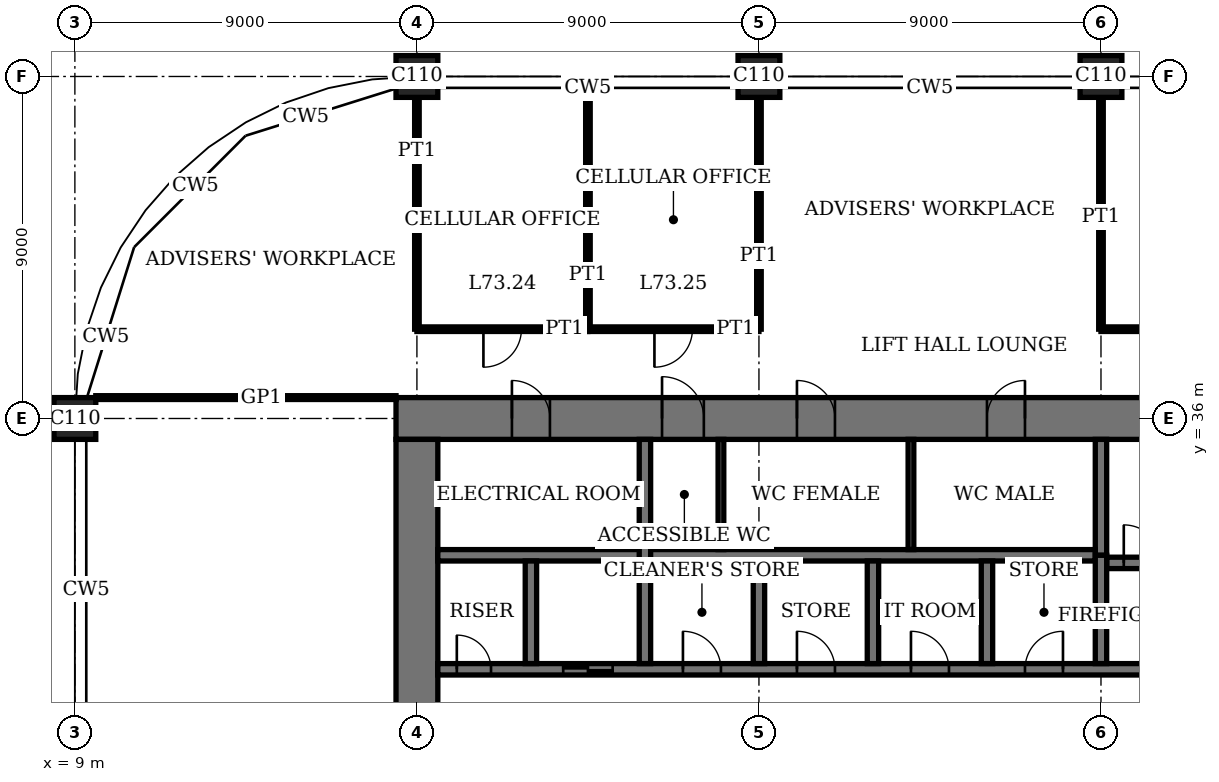
"""IFC4 building model, lengths in metres.
Left out: names, types, materials, properties, quantities, classifications, styles, units other than length and angle.
Written with IfcOpenShell. Run it as: python <this file> out.ifc"""

import sys

from ifc_helpers import new_model, si_unit, direction, frame, frame_2d, origin, origin_2d, place, context, subcontext, project, spatial, rectangle, extrude, element, fill, save


model = new_model("IFC4")
c1 = context("Model", 3, precision=1e-05, world=origin(), true_north=direction((0.0, 1.0)))
c2 = subcontext(c1, "Body", "Model", "MODEL_VIEW")
j1 = project(units=[si_unit("LENGTHUNIT", "METRE"), si_unit("PLANEANGLEUNIT", "RADIAN")], contexts=[c1])
p1 = place(None, origin())
s1 = spatial("IfcSite", under=j1, at=p1, CompositionType="ELEMENT")
p2 = place(p1, origin())
s2 = spatial("IfcBuilding", under=s1, at=p2, CompositionType="ELEMENT")
p3 = place(p2, frame((0.0, 0.0, 299.4)))
s3 = spatial("IfcBuildingStorey", under=s2, at=p3, CompositionType="ELEMENT", Elevation=299.4)
for number, where, z_axis, x_axis in (
    (1, (9.0, 36.0, 0.0), (0.0, 0.0, 1.0), (1.0, 0.0, 0.0)),
    (2, (18.0, 45.0, 0.0), (0.0, 0.0, 1.0), (1.0, 0.0, 0.0)),
    (3, (27.0, 45.0, 0.0), (0.0, 0.0, 1.0), (1.0, 0.0, 0.0)),
    (4, (36.0, 45.0, 0.0), (0.0, 0.0, 1.0), (1.0, 0.0, 0.0)),
):
    element("IfcColumn", number, at=place(p3, frame(where, z_axis=z_axis, x_axis=x_axis)), inside=s3, PredefinedType="COLUMN", context=c2, shape_type="SweptSolid", body=[
        extrude(rectangle(XDim=1.1, YDim=1.1, at=origin_2d()), origin(), (0.0, 0.0, 1.0), 4.0),
    ])
p4 = place(p3, frame((45.55, 36.0, 0.0), z_axis=(0.0, 0.0, 1.0), x_axis=(-1.0, 0.0, 0.0)))
e5 = element("IfcWall", 5, at=p4, inside=s3, PredefinedType="SHEAR", context=c2, shape_type="SweptSolid", body=[
    extrude(rectangle(XDim=28.1, YDim=1.1, at=frame_2d((14.05, 0.0))), origin(), (0.0, 0.0, 1.0), 4.0),
])
p5 = place(p4, frame((11.55, 0.0, 0.0)))
e6 = element("IfcOpeningElement", 6, at=p5, cuts=e5, PredefinedType="OPENING", context=c2, shape_type="SweptSolid", body=[
    extrude(rectangle(XDim=1.0, YDim=2.4, at=frame_2d((0.5, 1.2))), frame((0.0, 0.56, 0.0), z_axis=(0.0, -1.0, 0.0), x_axis=(1.0, 0.0, 0.0)), (0.0, 0.0, 1.0), 1.12),
])
p6 = place(p4, frame((16.55, 0.0, 0.0)))
e7 = element("IfcOpeningElement", 7, at=p6, cuts=e5, PredefinedType="OPENING", context=c2, shape_type="SweptSolid", body=[
    extrude(rectangle(XDim=1.0, YDim=2.4, at=frame_2d((0.5, 1.2))), frame((0.0, 0.56, 0.0), z_axis=(0.0, -1.0, 0.0), x_axis=(1.0, 0.0, 0.0)), (0.0, 0.0, 1.0), 1.12),
])
p7 = place(p4, frame((20.0, 0.0, 0.0)))
e8 = element("IfcOpeningElement", 8, at=p7, cuts=e5, PredefinedType="OPENING", context=c2, shape_type="SweptSolid", body=[
    extrude(rectangle(XDim=1.1, YDim=2.4, at=frame_2d((0.55, 1.2))), frame((0.0, 0.56, 0.0), z_axis=(0.0, -1.0, 0.0), x_axis=(1.0, 0.0, 0.0)), (0.0, 0.0, 1.0), 1.12),
])
p8 = place(p4, frame((24.05, 0.0, 0.0)))
e9 = element("IfcOpeningElement", 9, at=p8, cuts=e5, PredefinedType="OPENING", context=c2, shape_type="SweptSolid", body=[
    extrude(rectangle(XDim=1.0, YDim=2.4, at=frame_2d((0.5, 1.2))), frame((0.0, 0.56, 0.0), z_axis=(0.0, -1.0, 0.0), x_axis=(1.0, 0.0, 0.0)), (0.0, 0.0, 1.0), 1.12),
])
p9 = place(p3, frame((18.0, 35.45, 0.0), z_axis=(0.0, 0.0, 1.0), x_axis=(0.0, -1.0, 0.0)))
e10 = element("IfcWall", 10, at=p9, inside=s3, PredefinedType="SHEAR", context=c2, shape_type="SweptSolid", body=[
    extrude(rectangle(XDim=16.9, YDim=1.1, at=frame_2d((8.45, 0.0))), origin(), (0.0, 0.0, 1.0), 4.0),
])
p10 = place(p9, frame((8.45, 0.0, 0.0)))
e11 = element("IfcOpeningElement", 11, at=p10, cuts=e10, PredefinedType="OPENING", context=c2, shape_type="SweptSolid", body=[
    extrude(rectangle(XDim=1.8, YDim=2.4, at=frame_2d((0.9, 1.2))), frame((0.0, 0.56, 0.0), z_axis=(0.0, -1.0, 0.0), x_axis=(1.0, 0.0, 0.0)), (0.0, 0.0, 1.0), 1.12),
])
p11 = place(p3, frame((36.15, 32.2, 0.0), z_axis=(0.0, 0.0, 1.0), x_axis=(1.0, 0.0, 0.0)))
e12 = element("IfcWall", 12, at=p11, inside=s3, PredefinedType="SHEAR", context=c2, shape_type="SweptSolid", body=[
    extrude(rectangle(XDim=8.3, YDim=0.3, at=frame_2d((4.15, 0.0))), origin(), (0.0, 0.0, 1.0), 4.0),
])
p12 = place(p11, frame((0.45, 0.0, 0.0)))
e13 = element("IfcOpeningElement", 13, at=p12, cuts=e12, PredefinedType="OPENING", context=c2, shape_type="SweptSolid", body=[
    extrude(rectangle(XDim=1.0, YDim=2.4, at=frame_2d((0.5, 1.2))), frame((0.0, 0.16, 0.0), z_axis=(0.0, -1.0, 0.0), x_axis=(1.0, 0.0, 0.0)), (0.0, 0.0, 1.0), 0.32),
])
p13 = place(p3, frame((36.0, 32.4, 0.0), z_axis=(0.0, 0.0, 1.0), x_axis=(0.0, 1.0, 0.0)))
e14 = element("IfcWall", 14, at=p13, inside=s3, PredefinedType="SHEAR", context=c2, shape_type="SweptSolid", body=[
    extrude(rectangle(XDim=3.05, YDim=0.3, at=frame_2d((1.525, 0.0))), origin(), (0.0, 0.0, 1.0), 4.0),
])
p14 = place(p3, frame((18.55, 29.4, 0.0), z_axis=(0.0, 0.0, 1.0), x_axis=(1.0, 0.0, 0.0)))
e15 = element("IfcWall", 15, at=p14, inside=s3, PredefinedType="SHEAR", context=c2, shape_type="SweptSolid", body=[
    extrude(rectangle(XDim=25.9, YDim=0.3, at=frame_2d((12.95, 0.0))), origin(), (0.0, 0.0, 1.0), 4.0),
])
p15 = place(p14, frame((19.95, 0.0, 0.0)))
e16 = element("IfcOpeningElement", 16, at=p15, cuts=e15, PredefinedType="OPENING", context=c2, shape_type="SweptSolid", body=[
    extrude(rectangle(XDim=1.0, YDim=2.4, at=frame_2d((0.5, 1.2))), frame((0.0, 0.16, 0.0), z_axis=(0.0, -1.0, 0.0), x_axis=(1.0, 0.0, 0.0)), (0.0, 0.0, 1.0), 0.32),
])
p16 = place(p14, frame((0.5, 0.0, 0.0)))
e17 = element("IfcOpeningElement", 17, at=p16, cuts=e15, PredefinedType="OPENING", context=c2, shape_type="SweptSolid", body=[
    extrude(rectangle(XDim=0.9, YDim=2.1, at=frame_2d((0.45, 1.05))), frame((0.0, 0.16, 0.0), z_axis=(0.0, -1.0, 0.0), x_axis=(1.0, 0.0, 0.0)), (0.0, 0.0, 1.0), 0.32),
])
p17 = place(p14, frame((15.45, 0.0, 0.0)))
e18 = element("IfcOpeningElement", 18, at=p17, cuts=e15, PredefinedType="OPENING", context=c2, shape_type="SweptSolid", body=[
    extrude(rectangle(XDim=1.0, YDim=2.4, at=frame_2d((0.5, 1.2))), frame((0.0, 0.16, 0.0), z_axis=(0.0, -1.0, 0.0), x_axis=(1.0, 0.0, 0.0)), (0.0, 0.0, 1.0), 0.32),
])
p18 = place(p14, frame((12.45, 0.0, 0.0)))
e19 = element("IfcOpeningElement", 19, at=p18, cuts=e15, PredefinedType="OPENING", context=c2, shape_type="SweptSolid", body=[
    extrude(rectangle(XDim=1.0, YDim=2.4, at=frame_2d((0.5, 1.2))), frame((0.0, 0.16, 0.0), z_axis=(0.0, -1.0, 0.0), x_axis=(1.0, 0.0, 0.0)), (0.0, 0.0, 1.0), 0.32),
])
p19 = place(p14, frame((9.45, 0.0, 0.0)))
e20 = element("IfcOpeningElement", 20, at=p19, cuts=e15, PredefinedType="OPENING", context=c2, shape_type="SweptSolid", body=[
    extrude(rectangle(XDim=1.0, YDim=2.4, at=frame_2d((0.5, 1.2))), frame((0.0, 0.16, 0.0), z_axis=(0.0, -1.0, 0.0), x_axis=(1.0, 0.0, 0.0)), (0.0, 0.0, 1.0), 0.32),
])
p20 = place(p14, frame((6.45, 0.0, 0.0)))
e21 = element("IfcOpeningElement", 21, at=p20, cuts=e15, PredefinedType="OPENING", context=c2, shape_type="SweptSolid", body=[
    extrude(rectangle(XDim=1.0, YDim=2.4, at=frame_2d((0.5, 1.2))), frame((0.0, 0.16, 0.0), z_axis=(0.0, -1.0, 0.0), x_axis=(1.0, 0.0, 0.0)), (0.0, 0.0, 1.0), 0.32),
])
p21 = place(p14, frame((3.3, 0.0, 0.0)))
e22 = element("IfcOpeningElement", 22, at=p21, cuts=e15, PredefinedType="OPENING", context=c2, shape_type="SweptSolid", body=[
    extrude(rectangle(XDim=1.3, YDim=2.4, at=frame_2d((0.65, 1.2))), frame((0.0, 0.16, 0.0), z_axis=(0.0, -1.0, 0.0), x_axis=(1.0, 0.0, 0.0)), (0.0, 0.0, 1.0), 0.32),
])
p22 = place(p3, frame((18.55, 32.4, 0.0), z_axis=(0.0, 0.0, 1.0), x_axis=(1.0, 0.0, 0.0)))
e23 = element("IfcWall", 23, at=p22, inside=s3, PredefinedType="SHEAR", context=c2, shape_type="SweptSolid", body=[
    extrude(rectangle(XDim=17.3, YDim=0.3, at=frame_2d((8.65, 0.0))), origin(), (0.0, 0.0, 1.0), 4.0),
])
for number, where, z_axis, x_axis in (
    (24, (33.0, 29.55, 0.0), (0.0, 0.0, 1.0), (0.0, 1.0, 0.0)),
    (25, (30.0, 29.55, 0.0), (0.0, 0.0, 1.0), (0.0, 1.0, 0.0)),
    (26, (27.0, 29.55, 0.0), (0.0, 0.0, 1.0), (0.0, 1.0, 0.0)),
):
    element("IfcWall", number, at=place(p3, frame(where, z_axis=z_axis, x_axis=x_axis)), inside=s3, PredefinedType="SHEAR", context=c2, shape_type="SweptSolid", body=[
        extrude(rectangle(XDim=2.7, YDim=0.3, at=frame_2d((1.35, 0.0))), origin(), (0.0, 0.0, 1.0), 4.0),
    ])
p23 = place(p3, frame((24.0, 29.55, 0.0), z_axis=(0.0, 0.0, 1.0), x_axis=(0.0, 1.0, 0.0)))
e27 = element("IfcWall", 27, at=p23, inside=s3, PredefinedType="SHEAR", context=c2, shape_type="SweptSolid", body=[
    extrude(rectangle(XDim=5.9, YDim=0.3, at=frame_2d((2.95, 0.0))), origin(), (0.0, 0.0, 1.0), 4.0),
])
p24 = place(p3, frame((21.0, 29.55, 0.0), z_axis=(0.0, 0.0, 1.0), x_axis=(0.0, 1.0, 0.0)))
e28 = element("IfcWall", 28, at=p24, inside=s3, PredefinedType="SHEAR", context=c2, shape_type="SweptSolid", body=[
    extrude(rectangle(XDim=2.7, YDim=0.3, at=frame_2d((1.35, 0.0))), origin(), (0.0, 0.0, 1.0), 4.0),
])
p25 = place(p3, frame((36.0, 29.55, 0.0), z_axis=(0.0, 0.0, 1.0), x_axis=(0.0, 1.0, 0.0)))
e29 = element("IfcWall", 29, at=p25, inside=s3, PredefinedType="SHEAR", context=c2, shape_type="SweptSolid", body=[
    extrude(rectangle(XDim=2.85, YDim=0.3, at=frame_2d((1.425, 0.0))), origin(), (0.0, 0.0, 1.0), 4.0),
])
p26 = place(p3, frame((9.55, 36.55, 0.0), z_axis=(0.0, 0.0, 1.0), x_axis=(1.0, 0.0, 0.0)))
e30 = element("IfcWall", 30, at=p26, inside=s3, PredefinedType="PARTITIONING", context=c2, shape_type="SweptSolid", body=[
    extrude(rectangle(XDim=7.9, YDim=0.1, at=frame_2d((3.95, 0.0))), origin(), (0.0, 0.0, 1.0), 3.75),
])
p27 = place(p3, frame((18.0, 38.35, 0.0), z_axis=(0.0, 0.0, 1.0), x_axis=(1.0, 0.0, 0.0)))
e31 = element("IfcWall", 31, at=p27, inside=s3, PredefinedType="PARTITIONING", context=c2, shape_type="SweptSolid", body=[
    extrude(rectangle(XDim=4.5, YDim=0.12, at=frame_2d((2.25, 0.0))), origin(), (0.0, 0.0, 1.0), 3.75),
])
p28 = place(p27, frame((1.75, 0.0, 0.0)))
e32 = element("IfcOpeningElement", 32, at=p28, cuts=e31, PredefinedType="OPENING", context=c2, shape_type="SweptSolid", body=[
    extrude(rectangle(XDim=1.0, YDim=2.4, at=frame_2d((0.5, 1.2))), frame((0.0, 0.07, 0.0), z_axis=(0.0, -1.0, 0.0), x_axis=(1.0, 0.0, 0.0)), (0.0, 0.0, 1.0), 0.14),
])
p29 = place(p3, frame((22.5, 38.35, 0.0), z_axis=(0.0, 0.0, 1.0), x_axis=(1.0, 0.0, 0.0)))
e33 = element("IfcWall", 33, at=p29, inside=s3, PredefinedType="PARTITIONING", context=c2, shape_type="SweptSolid", body=[
    extrude(rectangle(XDim=4.5, YDim=0.12, at=frame_2d((2.25, 0.0))), origin(), (0.0, 0.0, 1.0), 3.75),
])
p30 = place(p29, frame((1.75, 0.0, 0.0)))
e34 = element("IfcOpeningElement", 34, at=p30, cuts=e33, PredefinedType="OPENING", context=c2, shape_type="SweptSolid", body=[
    extrude(rectangle(XDim=1.0, YDim=2.4, at=frame_2d((0.5, 1.2))), frame((0.0, 0.07, 0.0), z_axis=(0.0, -1.0, 0.0), x_axis=(1.0, 0.0, 0.0)), (0.0, 0.0, 1.0), 0.14),
])
p31 = place(p3, frame((36.0, 38.35, 0.0), z_axis=(0.0, 0.0, 1.0), x_axis=(1.0, 0.0, 0.0)))
e35 = element("IfcWall", 35, at=p31, inside=s3, PredefinedType="PARTITIONING", context=c2, shape_type="SweptSolid", body=[
    extrude(rectangle(XDim=9.0, YDim=0.12, at=frame_2d((4.5, 0.0))), origin(), (0.0, 0.0, 1.0), 3.75),
])
p32 = place(p31, frame((4.0, 0.0, 0.0)))
e36 = element("IfcOpeningElement", 36, at=p32, cuts=e35, PredefinedType="OPENING", context=c2, shape_type="SweptSolid", body=[
    extrude(rectangle(XDim=1.0, YDim=2.4, at=frame_2d((0.5, 1.2))), frame((0.0, 0.07, 0.0), z_axis=(0.0, -1.0, 0.0), x_axis=(1.0, 0.0, 0.0)), (0.0, 0.0, 1.0), 0.14),
])
p33 = place(p3, frame((18.0, 38.35, 0.0), z_axis=(0.0, 0.0, 1.0), x_axis=(0.0, 1.0, 0.0)))
e37 = element("IfcWall", 37, at=p33, inside=s3, PredefinedType="PARTITIONING", context=c2, shape_type="SweptSolid", body=[
    extrude(rectangle(XDim=6.1, YDim=0.12, at=frame_2d((3.05, 0.0))), origin(), (0.0, 0.0, 1.0), 3.05),
])
p34 = place(p3, frame((22.5, 38.35, 0.0), z_axis=(0.0, 0.0, 1.0), x_axis=(0.0, 1.0, 0.0)))
e38 = element("IfcWall", 38, at=p34, inside=s3, PredefinedType="PARTITIONING", context=c2, shape_type="SweptSolid", body=[
    extrude(rectangle(XDim=6.34, YDim=0.12, at=frame_2d((3.17, 0.0))), origin(), (0.0, 0.0, 1.0), 3.75),
])
for number, where, z_axis, x_axis in (
    (39, (27.0, 38.35, 0.0), (0.0, 0.0, 1.0), (0.0, 1.0, 0.0)),
    (40, (36.0, 38.35, 0.0), (0.0, 0.0, 1.0), (0.0, 1.0, 0.0)),
):
    element("IfcWall", number, at=place(p3, frame(where, z_axis=z_axis, x_axis=x_axis)), inside=s3, PredefinedType="PARTITIONING", context=c2, shape_type="SweptSolid", body=[
        extrude(rectangle(XDim=6.1, YDim=0.12, at=frame_2d((3.05, 0.0))), origin(), (0.0, 0.0, 1.0), 3.05),
    ])
for number, where, z_axis, x_axis in (
    (41, (31.0, 32.55, 0.0), (0.0, 0.0, 1.0), (0.0, 1.0, 0.0)),
    (42, (26.0, 32.55, 0.0), (0.0, 0.0, 1.0), (0.0, 1.0, 0.0)),
):
    element("IfcWall", number, at=place(p3, frame(where, z_axis=z_axis, x_axis=x_axis)), inside=s3, PredefinedType="PARTITIONING", context=c2, shape_type="SweptSolid", body=[
        extrude(rectangle(XDim=2.9, YDim=0.15, at=frame_2d((1.45, 0.0))), origin(), (0.0, 0.0, 1.0), 3.75),
    ])
p35 = place(p5, origin())
e43 = element("IfcDoor", 43, at=p35, inside=s3, OperationType="SINGLE_SWING_LEFT", PredefinedType="DOOR", context=c2, shape_type="SweptSolid", body=[
    extrude(rectangle(XDim=1.0, YDim=2.4, at=frame_2d((0.5, 1.2))), frame((0.0, 0.025, 0.0), z_axis=(0.0, -1.0, 0.0), x_axis=(1.0, 0.0, 0.0)), (0.0, 0.0, 1.0), 0.05),
    extrude(rectangle(XDim=0.04, YDim=2.4, at=frame_2d((0.02, 1.2))), frame((0.0, 0.4, 0.0), z_axis=(0.0, -1.0, 0.0), x_axis=(1.0, 0.0, 0.0)), (0.0, 0.0, 1.0), 0.8),
    extrude(rectangle(XDim=0.04, YDim=2.4, at=frame_2d((0.98, 1.2))), frame((0.0, 0.4, 0.0), z_axis=(0.0, -1.0, 0.0), x_axis=(1.0, 0.0, 0.0)), (0.0, 0.0, 1.0), 0.8),
    extrude(rectangle(XDim=1.0, YDim=0.04, at=frame_2d((0.5, 2.38))), frame((0.0, 0.4, 0.0), z_axis=(0.0, -1.0, 0.0), x_axis=(1.0, 0.0, 0.0)), (0.0, 0.0, 1.0), 0.8),
])
fill(e6, e43)
p36 = place(p6, origin())
e44 = element("IfcDoor", 44, at=p36, inside=s3, OperationType="SINGLE_SWING_RIGHT", PredefinedType="DOOR", context=c2, shape_type="SweptSolid", body=[
    extrude(rectangle(XDim=1.0, YDim=2.4, at=frame_2d((0.5, 1.2))), frame((0.0, 0.025, 0.0), z_axis=(0.0, -1.0, 0.0), x_axis=(1.0, 0.0, 0.0)), (0.0, 0.0, 1.0), 0.05),
    extrude(rectangle(XDim=0.04, YDim=2.4, at=frame_2d((0.02, 1.2))), frame((0.0, 0.4, 0.0), z_axis=(0.0, -1.0, 0.0), x_axis=(1.0, 0.0, 0.0)), (0.0, 0.0, 1.0), 0.8),
    extrude(rectangle(XDim=0.04, YDim=2.4, at=frame_2d((0.98, 1.2))), frame((0.0, 0.4, 0.0), z_axis=(0.0, -1.0, 0.0), x_axis=(1.0, 0.0, 0.0)), (0.0, 0.0, 1.0), 0.8),
    extrude(rectangle(XDim=1.0, YDim=0.04, at=frame_2d((0.5, 2.38))), frame((0.0, 0.4, 0.0), z_axis=(0.0, -1.0, 0.0), x_axis=(1.0, 0.0, 0.0)), (0.0, 0.0, 1.0), 0.8),
])
fill(e7, e44)
p37 = place(p7, origin())
e45 = element("IfcDoor", 45, at=p37, inside=s3, OperationType="SINGLE_SWING_RIGHT", PredefinedType="DOOR", context=c2, shape_type="SweptSolid", body=[
    extrude(rectangle(XDim=1.1, YDim=2.4, at=frame_2d((0.55, 1.2))), frame((0.0, 0.025, 0.0), z_axis=(0.0, -1.0, 0.0), x_axis=(1.0, 0.0, 0.0)), (0.0, 0.0, 1.0), 0.05),
    extrude(rectangle(XDim=0.04, YDim=2.4, at=frame_2d((0.02, 1.2))), frame((0.0, 0.44, 0.0), z_axis=(0.0, -1.0, 0.0), x_axis=(1.0, 0.0, 0.0)), (0.0, 0.0, 1.0), 0.88),
    extrude(rectangle(XDim=0.04, YDim=2.4, at=frame_2d((1.08, 1.2))), frame((0.0, 0.44, 0.0), z_axis=(0.0, -1.0, 0.0), x_axis=(1.0, 0.0, 0.0)), (0.0, 0.0, 1.0), 0.88),
    extrude(rectangle(XDim=1.1, YDim=0.04, at=frame_2d((0.55, 2.38))), frame((0.0, 0.44, 0.0), z_axis=(0.0, -1.0, 0.0), x_axis=(1.0, 0.0, 0.0)), (0.0, 0.0, 1.0), 0.88),
])
fill(e8, e45)
p38 = place(p8, origin())
e46 = element("IfcDoor", 46, at=p38, inside=s3, OperationType="SINGLE_SWING_RIGHT", PredefinedType="DOOR", context=c2, shape_type="SweptSolid", body=[
    extrude(rectangle(XDim=1.0, YDim=2.4, at=frame_2d((0.5, 1.2))), frame((0.0, 0.025, 0.0), z_axis=(0.0, -1.0, 0.0), x_axis=(1.0, 0.0, 0.0)), (0.0, 0.0, 1.0), 0.05),
    extrude(rectangle(XDim=0.04, YDim=2.4, at=frame_2d((0.02, 1.2))), frame((0.0, 0.4, 0.0), z_axis=(0.0, -1.0, 0.0), x_axis=(1.0, 0.0, 0.0)), (0.0, 0.0, 1.0), 0.8),
    extrude(rectangle(XDim=0.04, YDim=2.4, at=frame_2d((0.98, 1.2))), frame((0.0, 0.4, 0.0), z_axis=(0.0, -1.0, 0.0), x_axis=(1.0, 0.0, 0.0)), (0.0, 0.0, 1.0), 0.8),
    extrude(rectangle(XDim=1.0, YDim=0.04, at=frame_2d((0.5, 2.38))), frame((0.0, 0.4, 0.0), z_axis=(0.0, -1.0, 0.0), x_axis=(1.0, 0.0, 0.0)), (0.0, 0.0, 1.0), 0.8),
])
fill(e9, e46)
p39 = place(p12, origin())
e47 = element("IfcDoor", 47, at=p39, inside=s3, OperationType="SINGLE_SWING_RIGHT", PredefinedType="DOOR", context=c2, shape_type="SweptSolid", body=[
    extrude(rectangle(XDim=1.0, YDim=2.4, at=frame_2d((0.5, 1.2))), frame((0.0, 0.03, 0.0), z_axis=(0.0, -1.0, 0.0), x_axis=(1.0, 0.0, 0.0)), (0.0, 0.0, 1.0), 0.06),
])
fill(e13, e47)
p40 = place(p16, origin())
e48 = element("IfcDoor", 48, at=p40, inside=s3, OperationType="SINGLE_SWING_RIGHT", PredefinedType="DOOR", context=c2, shape_type="SweptSolid", body=[
    extrude(rectangle(XDim=0.9, YDim=2.1, at=frame_2d((0.45, 1.05))), frame((0.0, 0.03, 0.0), z_axis=(0.0, -1.0, 0.0), x_axis=(1.0, 0.0, 0.0)), (0.0, 0.0, 1.0), 0.06),
])
fill(e17, e48)
p41 = place(p28, origin())
e49 = element("IfcDoor", 49, at=p41, inside=s3, OperationType="SINGLE_SWING_LEFT", PredefinedType="DOOR", context=c2, shape_type="SweptSolid", body=[
    extrude(rectangle(XDim=1.0, YDim=2.4, at=frame_2d((0.5, 1.2))), frame((0.0, 0.025, 0.0), z_axis=(0.0, -1.0, 0.0), x_axis=(1.0, 0.0, 0.0)), (0.0, 0.0, 1.0), 0.05),
])
fill(e32, e49)
p42 = place(p30, origin())
e50 = element("IfcDoor", 50, at=p42, inside=s3, OperationType="SINGLE_SWING_LEFT", PredefinedType="DOOR", context=c2, shape_type="SweptSolid", body=[
    extrude(rectangle(XDim=1.0, YDim=2.4, at=frame_2d((0.5, 1.2))), frame((0.0, 0.025, 0.0), z_axis=(0.0, -1.0, 0.0), x_axis=(1.0, 0.0, 0.0)), (0.0, 0.0, 1.0), 0.05),
])
fill(e34, e50)
p43 = place(p17, origin())
e51 = element("IfcDoor", 51, at=p43, inside=s3, OperationType="SINGLE_SWING_LEFT", PredefinedType="DOOR", context=c2, shape_type="SweptSolid", body=[
    extrude(rectangle(XDim=1.0, YDim=2.4, at=frame_2d((0.5, 1.2))), frame((0.0, 0.03, 0.0), z_axis=(0.0, -1.0, 0.0), x_axis=(1.0, 0.0, 0.0)), (0.0, 0.0, 1.0), 0.06),
])
fill(e18, e51)
p44 = place(p18, origin())
e52 = element("IfcDoor", 52, at=p44, inside=s3, OperationType="SINGLE_SWING_RIGHT", PredefinedType="DOOR", context=c2, shape_type="SweptSolid", body=[
    extrude(rectangle(XDim=1.0, YDim=2.4, at=frame_2d((0.5, 1.2))), frame((0.0, 0.03, 0.0), z_axis=(0.0, -1.0, 0.0), x_axis=(1.0, 0.0, 0.0)), (0.0, 0.0, 1.0), 0.06),
])
fill(e19, e52)
p45 = place(p19, origin())
e53 = element("IfcDoor", 53, at=p45, inside=s3, OperationType="SINGLE_SWING_RIGHT", PredefinedType="DOOR", context=c2, shape_type="SweptSolid", body=[
    extrude(rectangle(XDim=1.0, YDim=2.4, at=frame_2d((0.5, 1.2))), frame((0.0, 0.03, 0.0), z_axis=(0.0, -1.0, 0.0), x_axis=(1.0, 0.0, 0.0)), (0.0, 0.0, 1.0), 0.06),
])
fill(e20, e53)
p46 = place(p20, origin())
e54 = element("IfcDoor", 54, at=p46, inside=s3, OperationType="SINGLE_SWING_RIGHT", PredefinedType="DOOR", context=c2, shape_type="SweptSolid", body=[
    extrude(rectangle(XDim=1.0, YDim=2.4, at=frame_2d((0.5, 1.2))), frame((0.0, 0.03, 0.0), z_axis=(0.0, -1.0, 0.0), x_axis=(1.0, 0.0, 0.0)), (0.0, 0.0, 1.0), 0.06),
])
fill(e21, e54)
p47 = place(p21, origin())
e55 = element("IfcDoor", 55, at=p47, inside=s3, OperationType="DOUBLE_DOOR_SLIDING", PredefinedType="DOOR", context=c2, shape_type="SweptSolid", body=[
    extrude(rectangle(XDim=1.3, YDim=2.4, at=frame_2d((0.65, 1.2))), frame((0.0, 0.02, 0.0), z_axis=(0.0, -1.0, 0.0), x_axis=(1.0, 0.0, 0.0)), (0.0, 0.0, 1.0), 0.04),
])
fill(e22, e55)
save(model, sys.argv[1])
